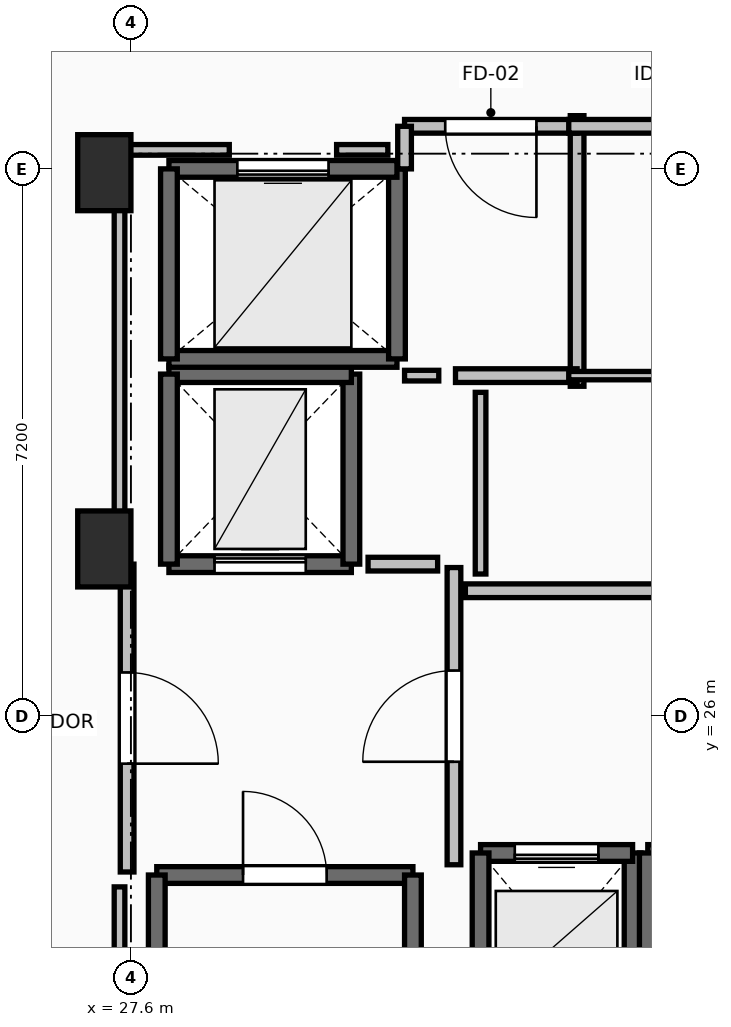
"""IFC4 building model, lengths in metres.
Left out: names, types, materials, properties, quantities, classifications, styles, units other than length and angle.
Written with IfcOpenShell. Run it as: python <this file> out.ifc"""

import sys

from ifc_helpers import new_model, si_unit, direction, frame, frame_2d, origin, origin_2d, place, context, subcontext, project, spatial, rectangle, extrude, element, fill, save


model = new_model("IFC4")
c1 = context("Model", 3, precision=1e-05, world=origin(), true_north=direction((0.0, 1.0)))
c2 = subcontext(c1, "Body", "Model", "MODEL_VIEW")
j1 = project(units=[si_unit("LENGTHUNIT", "METRE"), si_unit("PLANEANGLEUNIT", "RADIAN")], contexts=[c1])
p1 = place(None, origin())
s1 = spatial("IfcSite", under=j1, at=p1, CompositionType="ELEMENT")
p2 = place(p1, origin())
s2 = spatial("IfcBuilding", under=s1, at=p2, CompositionType="ELEMENT")
p3 = place(p2, frame((0.0, 0.0, 210.75)))
s3 = spatial("IfcBuildingStorey", under=s2, at=p3, CompositionType="ELEMENT", Elevation=210.75)
for number, where, z_axis, x_axis in (
    (1, (27.25, 28.2, 0.0), (0.0, 0.0, 1.0), (1.0, 0.0, 0.0)),
    (2, (27.25, 33.15, 0.0), (0.0, 0.0, 1.0), (1.0, 0.0, 0.0)),
):
    element("IfcColumn", number, at=place(p3, frame(where, z_axis=z_axis, x_axis=x_axis)), inside=s3, PredefinedType="PILASTER", context=c2, shape_type="SweptSolid", body=[
        extrude(rectangle(XDim=0.7, YDim=1.0, at=origin_2d()), origin(), (0.0, 0.0, 1.0), 3.55),
    ])
p4 = place(p3, frame((27.94, 23.91, 0.0), z_axis=(0.0, 0.0, 1.0), x_axis=(1.0, 0.0, 0.0)))
e3 = element("IfcWall", 3, at=p4, inside=s3, PredefinedType="SOLIDWALL", context=c2, shape_type="SweptSolid", body=[
    extrude(rectangle(XDim=3.37, YDim=0.22, at=frame_2d((1.685, 0.0))), origin(), (0.0, 0.0, 1.0), 3.29),
])
p5 = place(p4, frame((1.135, 0.0, 0.0)))
e4 = element("IfcOpeningElement", 4, at=p5, cuts=e3, PredefinedType="OPENING", context=c2, shape_type="SweptSolid", body=[
    extrude(rectangle(XDim=1.1, YDim=2.15, at=frame_2d((0.55, 1.075))), frame((0.0, 0.125, 0.0), z_axis=(0.0, -1.0, 0.0), x_axis=(1.0, 0.0, 0.0)), (0.0, 0.0, 1.0), 0.25),
])
for number, where, z_axis, x_axis in (
    (5, (31.31, 23.91, 0.0), (0.0, 0.0, 1.0), (0.0, -1.0, 0.0)),
    (6, (27.94, 16.49, 0.0), (0.0, 0.0, 1.0), (0.0, 1.0, 0.0)),
):
    element("IfcWall", number, at=place(p3, frame(where, z_axis=z_axis, x_axis=x_axis)), inside=s3, PredefinedType="SOLIDWALL", context=c2, shape_type="SweptSolid", body=[
        extrude(rectangle(XDim=7.42, YDim=0.22, at=frame_2d((3.71, 0.0))), origin(), (0.0, 0.0, 1.0), 3.29),
    ])
p6 = place(p3, frame((34.2, 21.8, 0.0), z_axis=(0.0, 0.0, 1.0), x_axis=(0.0, 1.0, 0.0)))
e7 = element("IfcWall", 7, at=p6, inside=s3, PredefinedType="SOLIDWALL", context=c2, shape_type="SweptSolid", body=[
    extrude(rectangle(XDim=2.4, YDim=0.22, at=frame_2d((1.2, 0.0))), origin(), (0.0, 0.0, 1.0), 3.29),
])
p7 = place(p3, frame((34.2, 24.2, 0.0), z_axis=(0.0, 0.0, 1.0), x_axis=(-1.0, 0.0, 0.0)))
e8 = element("IfcWall", 8, at=p7, inside=s3, PredefinedType="SOLIDWALL", context=c2, shape_type="SweptSolid", body=[
    extrude(rectangle(XDim=2.0, YDim=0.22, at=frame_2d((1.0, 0.0))), origin(), (0.0, 0.0, 1.0), 3.29),
])
p8 = place(p7, frame((0.45, 0.0, 0.0)))
e9 = element("IfcOpeningElement", 9, at=p8, cuts=e8, PredefinedType="OPENING", context=c2, shape_type="SweptSolid", body=[
    extrude(rectangle(XDim=1.1, YDim=2.2, at=frame_2d((0.55, 1.1))), frame((0.0, 0.125, 0.0), z_axis=(0.0, -1.0, 0.0), x_axis=(1.0, 0.0, 0.0)), (0.0, 0.0, 1.0), 0.25),
])
p9 = place(p3, frame((32.2, 24.2, 0.0), z_axis=(0.0, 0.0, 1.0), x_axis=(0.0, -1.0, 0.0)))
e10 = element("IfcWall", 10, at=p9, inside=s3, PredefinedType="SOLIDWALL", context=c2, shape_type="SweptSolid", body=[
    extrude(rectangle(XDim=2.4, YDim=0.22, at=frame_2d((1.2, 0.0))), origin(), (0.0, 0.0, 1.0), 3.29),
])
p10 = place(p3, frame((36.4, 24.2, 0.0), z_axis=(0.0, 0.0, 1.0), x_axis=(-1.0, 0.0, 0.0)))
e11 = element("IfcWall", 11, at=p10, inside=s3, PredefinedType="SOLIDWALL", context=c2, shape_type="SweptSolid", body=[
    extrude(rectangle(XDim=2.0, YDim=0.22, at=frame_2d((1.0, 0.0))), origin(), (0.0, 0.0, 1.0), 3.29),
])
p11 = place(p10, frame((0.45, 0.0, 0.0)))
e12 = element("IfcOpeningElement", 12, at=p11, cuts=e11, PredefinedType="OPENING", context=c2, shape_type="SweptSolid", body=[
    extrude(rectangle(XDim=1.1, YDim=2.2, at=frame_2d((0.55, 1.1))), frame((0.0, 0.125, 0.0), z_axis=(0.0, -1.0, 0.0), x_axis=(1.0, 0.0, 0.0)), (0.0, 0.0, 1.0), 0.25),
])
p12 = place(p3, frame((34.4, 24.2, 0.0), z_axis=(0.0, 0.0, 1.0), x_axis=(0.0, -1.0, 0.0)))
e13 = element("IfcWall", 13, at=p12, inside=s3, PredefinedType="SOLIDWALL", context=c2, shape_type="SweptSolid", body=[
    extrude(rectangle(XDim=2.4, YDim=0.22, at=frame_2d((1.2, 0.0))), origin(), (0.0, 0.0, 1.0), 3.29),
])
p13 = place(p3, frame((28.1, 28.0, 0.0), z_axis=(0.0, 0.0, 1.0), x_axis=(1.0, 0.0, 0.0)))
e14 = element("IfcWall", 14, at=p13, inside=s3, PredefinedType="SHEAR", context=c2, shape_type="SweptSolid", body=[
    extrude(rectangle(XDim=2.4, YDim=0.22, at=frame_2d((1.2, 0.0))), origin(), (0.0, 0.0, 1.0), 3.29),
])
p14 = place(p13, frame((0.6, 0.0, 0.0)))
e15 = element("IfcOpeningElement", 15, at=p14, cuts=e14, PredefinedType="OPENING", context=c2, shape_type="SweptSolid", body=[
    extrude(rectangle(XDim=1.2, YDim=2.2, at=frame_2d((0.6, 1.1))), frame((0.0, 0.125, 0.0), z_axis=(0.0, -1.0, 0.0), x_axis=(1.0, 0.0, 0.0)), (0.0, 0.0, 1.0), 0.25),
])
p15 = place(p3, frame((30.5, 28.0, 0.0), z_axis=(0.0, 0.0, 1.0), x_axis=(0.0, 1.0, 0.0)))
e16 = element("IfcWall", 16, at=p15, inside=s3, PredefinedType="SHEAR", context=c2, shape_type="SweptSolid", body=[
    extrude(rectangle(XDim=2.5, YDim=0.22, at=frame_2d((1.25, 0.0))), origin(), (0.0, 0.0, 1.0), 3.29),
])
p16 = place(p3, frame((30.5, 30.5, 0.0), z_axis=(0.0, 0.0, 1.0), x_axis=(-1.0, 0.0, 0.0)))
e17 = element("IfcWall", 17, at=p16, inside=s3, PredefinedType="SHEAR", context=c2, shape_type="SweptSolid", body=[
    extrude(rectangle(XDim=2.4, YDim=0.22, at=frame_2d((1.2, 0.0))), origin(), (0.0, 0.0, 1.0), 3.29),
])
p17 = place(p3, frame((28.1, 30.5, 0.0), z_axis=(0.0, 0.0, 1.0), x_axis=(0.0, -1.0, 0.0)))
e18 = element("IfcWall", 18, at=p17, inside=s3, PredefinedType="SHEAR", context=c2, shape_type="SweptSolid", body=[
    extrude(rectangle(XDim=2.5, YDim=0.22, at=frame_2d((1.25, 0.0))), origin(), (0.0, 0.0, 1.0), 3.29),
])
p18 = place(p3, frame((28.1, 30.7, 0.0), z_axis=(0.0, 0.0, 1.0), x_axis=(1.0, 0.0, 0.0)))
e19 = element("IfcWall", 19, at=p18, inside=s3, PredefinedType="SOLIDWALL", context=c2, shape_type="SweptSolid", body=[
    extrude(rectangle(XDim=3.0, YDim=0.22, at=frame_2d((1.5, 0.0))), origin(), (0.0, 0.0, 1.0), 3.29),
])
p19 = place(p3, frame((31.1, 30.7, 0.0), z_axis=(0.0, 0.0, 1.0), x_axis=(0.0, 1.0, 0.0)))
e20 = element("IfcWall", 20, at=p19, inside=s3, PredefinedType="SOLIDWALL", context=c2, shape_type="SweptSolid", body=[
    extrude(rectangle(XDim=2.5, YDim=0.22, at=frame_2d((1.25, 0.0))), origin(), (0.0, 0.0, 1.0), 3.29),
])
p20 = place(p3, frame((31.1, 33.2, 0.0), z_axis=(0.0, 0.0, 1.0), x_axis=(-1.0, 0.0, 0.0)))
e21 = element("IfcWall", 21, at=p20, inside=s3, PredefinedType="SOLIDWALL", context=c2, shape_type="SweptSolid", body=[
    extrude(rectangle(XDim=3.0, YDim=0.22, at=frame_2d((1.5, 0.0))), origin(), (0.0, 0.0, 1.0), 3.29),
])
p21 = place(p20, frame((0.9, 0.0, 0.0)))
e22 = element("IfcOpeningElement", 22, at=p21, cuts=e21, PredefinedType="OPENING", context=c2, shape_type="SweptSolid", body=[
    extrude(rectangle(XDim=1.2, YDim=2.2, at=frame_2d((0.6, 1.1))), frame((0.0, 0.125, 0.0), z_axis=(0.0, -1.0, 0.0), x_axis=(1.0, 0.0, 0.0)), (0.0, 0.0, 1.0), 0.25),
])
p22 = place(p3, frame((28.1, 33.2, 0.0), z_axis=(0.0, 0.0, 1.0), x_axis=(0.0, -1.0, 0.0)))
e23 = element("IfcWall", 23, at=p22, inside=s3, PredefinedType="SOLIDWALL", context=c2, shape_type="SweptSolid", body=[
    extrude(rectangle(XDim=2.5, YDim=0.22, at=frame_2d((1.25, 0.0))), origin(), (0.0, 0.0, 1.0), 3.29),
])
p23 = place(p3, frame((31.85, 24.045, 0.0), z_axis=(0.0, 0.0, 1.0), x_axis=(0.0, 1.0, 0.0)))
e24 = element("IfcWall", 24, at=p23, inside=s3, PredefinedType="PARTITIONING", context=c2, shape_type="SweptSolid", body=[
    extrude(rectangle(XDim=3.91, YDim=0.18, at=frame_2d((1.955, 0.0))), origin(), (0.0, 0.0, 1.0), 3.29),
])
p24 = place(p23, frame((1.355, 0.0, 0.0)))
e25 = element("IfcOpeningElement", 25, at=p24, cuts=e24, PredefinedType="OPENING", context=c2, shape_type="SweptSolid", body=[
    extrude(rectangle(XDim=1.2, YDim=2.15, at=frame_2d((0.6, 1.075))), frame((0.0, 0.105, 0.0), z_axis=(0.0, -1.0, 0.0), x_axis=(1.0, 0.0, 0.0)), (0.0, 0.0, 1.0), 0.21),
])
p25 = place(p3, frame((27.55, 28.0, 0.0), z_axis=(0.0, 0.0, 1.0), x_axis=(0.0, -1.0, 0.0)))
e26 = element("IfcWall", 26, at=p25, inside=s3, PredefinedType="PARTITIONING", context=c2, shape_type="SweptSolid", body=[
    extrude(rectangle(XDim=4.05, YDim=0.18, at=frame_2d((2.025, 0.0))), origin(), (0.0, 0.0, 1.0), 3.29),
])
p26 = place(p25, frame((1.425, 0.0, 0.0)))
e27 = element("IfcOpeningElement", 27, at=p26, cuts=e26, PredefinedType="OPENING", context=c2, shape_type="SweptSolid", body=[
    extrude(rectangle(XDim=1.2, YDim=2.15, at=frame_2d((0.6, 1.075))), frame((0.0, 0.105, 0.0), z_axis=(0.0, -1.0, 0.0), x_axis=(1.0, 0.0, 0.0)), (0.0, 0.0, 1.0), 0.21),
])
p27 = place(p3, frame((33.47, 30.34, 0.0), z_axis=(0.0, 0.0, 1.0), x_axis=(0.0, 1.0, 0.0)))
e28 = element("IfcWall", 28, at=p27, inside=s3, PredefinedType="PARTITIONING", context=c2, shape_type="SweptSolid", body=[
    extrude(rectangle(XDim=3.56, YDim=0.18, at=frame_2d((1.78, 0.0))), origin(), (0.0, 0.0, 1.0), 3.29),
])
p28 = place(p3, frame((31.87, 30.48, 0.0), z_axis=(0.0, 0.0, 1.0), x_axis=(1.0, 0.0, 0.0)))
e29 = element("IfcWall", 29, at=p28, inside=s3, PredefinedType="PARTITIONING", context=c2, shape_type="SweptSolid", body=[
    extrude(rectangle(XDim=1.6, YDim=0.18, at=frame_2d((0.8, 0.0))), origin(), (0.0, 0.0, 1.0), 3.29),
])
p29 = place(p3, frame((33.47, 33.76, 0.0), z_axis=(0.0, 0.0, 1.0), x_axis=(-1.0, 0.0, 0.0)))
e30 = element("IfcWall", 30, at=p29, inside=s3, PredefinedType="PARTITIONING", context=c2, shape_type="SweptSolid", body=[
    extrude(rectangle(XDim=2.27, YDim=0.18, at=frame_2d((1.135, 0.0))), origin(), (0.0, 0.0, 1.0), 3.29),
])
p30 = place(p29, frame((0.535, 0.0, 0.0)))
e31 = element("IfcOpeningElement", 31, at=p30, cuts=e30, PredefinedType="OPENING", context=c2, shape_type="SweptSolid", body=[
    extrude(rectangle(XDim=1.2, YDim=2.15, at=frame_2d((0.6, 1.075))), frame((0.0, 0.105, 0.0), z_axis=(0.0, -1.0, 0.0), x_axis=(1.0, 0.0, 0.0)), (0.0, 0.0, 1.0), 0.21),
])
p31 = place(p3, frame((31.2, 33.76, 0.0), z_axis=(0.0, 0.0, 1.0), x_axis=(0.0, -1.0, 0.0)))
e32 = element("IfcWall", 32, at=p31, inside=s3, PredefinedType="PARTITIONING", context=c2, shape_type="SweptSolid", body=[
    extrude(rectangle(XDim=0.56, YDim=0.18, at=frame_2d((0.28, 0.0))), origin(), (0.0, 0.0, 1.0), 3.29),
])
p32 = place(p3, frame((39.19, 27.65, 0.0), z_axis=(0.0, 0.0, 1.0), x_axis=(-1.0, 0.0, 0.0)))
e33 = element("IfcWall", 33, at=p32, inside=s3, PredefinedType="PARTITIONING", context=c2, shape_type="SweptSolid", body=[
    extrude(rectangle(XDim=7.19, YDim=0.18, at=frame_2d((3.595, 0.0))), origin(), (0.0, 0.0, 1.0), 3.29),
])
p33 = place(p32, frame((3.095, 0.0, 0.0)))
e34 = element("IfcOpeningElement", 34, at=p33, cuts=e33, PredefinedType="OPENING", context=c2, shape_type="SweptSolid", body=[
    extrude(rectangle(XDim=1.0, YDim=2.15, at=frame_2d((0.5, 1.075))), frame((0.0, 0.105, 0.0), z_axis=(0.0, -1.0, 0.0), x_axis=(1.0, 0.0, 0.0)), (0.0, 0.0, 1.0), 0.21),
])
p34 = place(p3, frame((33.36, 30.48, 0.0), z_axis=(0.0, 0.0, 1.0), x_axis=(1.0, 0.0, 0.0)))
e35 = element("IfcWall", 35, at=p34, inside=s3, PredefinedType="PARTITIONING", context=c2, shape_type="SweptSolid", body=[
    extrude(rectangle(XDim=4.115, YDim=0.11, at=frame_2d((2.058, 0.0))), origin(), (0.0, 0.0, 1.0), 2.482),
])
p35 = place(p3, frame((37.49, 33.76, 0.0), z_axis=(0.0, 0.0, 1.0), x_axis=(-1.0, 0.0, 0.0)))
e36 = element("IfcWall", 36, at=p35, inside=s3, PredefinedType="PARTITIONING", context=c2, shape_type="SweptSolid", body=[
    extrude(rectangle(XDim=4.13, YDim=0.18, at=frame_2d((2.065, 0.0))), origin(), (0.0, 0.0, 1.0), 3.29),
])
p36 = place(p35, frame((1.64, 0.0, 0.0)))
e37 = element("IfcOpeningElement", 37, at=p36, cuts=e36, PredefinedType="OPENING", context=c2, shape_type="SweptSolid", body=[
    extrude(rectangle(XDim=0.85, YDim=2.1, at=frame_2d((0.425, 1.05))), frame((0.0, 0.105, 0.0), z_axis=(0.0, -1.0, 0.0), x_axis=(1.0, 0.0, 0.0)), (0.0, 0.0, 1.0), 0.21),
])
p37 = place(p3, frame((31.635, 28.0, 0.0), z_axis=(0.0, 0.0, 1.0), x_axis=(-1.0, 0.0, 0.0)))
e38 = element("IfcWall", 38, at=p37, inside=s3, PredefinedType="PARTITIONING", context=c2, shape_type="SweptSolid", body=[
    extrude(rectangle(XDim=0.915, YDim=0.18, at=frame_2d((0.458, 0.0))), origin(), (0.0, 0.0, 1.0), 3.29),
])
p38 = place(p3, frame((31.2, 30.48, 0.0), z_axis=(0.0, 0.0, 1.0), x_axis=(1.0, 0.0, 0.0)))
e39 = element("IfcWall", 39, at=p38, inside=s3, PredefinedType="PARTITIONING", context=c2, shape_type="SweptSolid", body=[
    extrude(rectangle(XDim=0.45, YDim=0.14, at=frame_2d((0.225, 0.0))), origin(), (0.0, 0.0, 1.0), 3.29),
])
p39 = place(p3, frame((32.2, 30.26, 0.0), z_axis=(0.0, 0.0, 1.0), x_axis=(0.0, -1.0, 0.0)))
e40 = element("IfcWall", 40, at=p39, inside=s3, PredefinedType="PARTITIONING", context=c2, shape_type="SweptSolid", body=[
    extrude(rectangle(XDim=2.39, YDim=0.14, at=frame_2d((1.195, 0.0))), origin(), (0.0, 0.0, 1.0), 3.29),
])
p40 = place(p3, frame((30.98, 33.45, 0.0), z_axis=(0.0, 0.0, 1.0), x_axis=(-1.0, 0.0, 0.0)))
e41 = element("IfcWall", 41, at=p40, inside=s3, PredefinedType="PARTITIONING", context=c2, shape_type="SweptSolid", body=[
    extrude(rectangle(XDim=0.674, YDim=0.14, at=frame_2d((0.337, 0.0))), origin(), (0.0, 0.0, 1.0), 3.29),
])
p41 = place(p3, frame((28.894, 33.45, 0.0), z_axis=(0.0, 0.0, 1.0), x_axis=(-1.0, 0.0, 0.0)))
e42 = element("IfcWall", 42, at=p41, inside=s3, PredefinedType="PARTITIONING", context=c2, shape_type="SweptSolid", body=[
    extrude(rectangle(XDim=1.444, YDim=0.14, at=frame_2d((0.722, 0.0))), origin(), (0.0, 0.0, 1.0), 2.482),
])
p42 = place(p3, frame((27.45, 33.45, 0.0), z_axis=(0.0, 0.0, 1.0), x_axis=(0.0, -1.0, 0.0)))
e43 = element("IfcWall", 43, at=p42, inside=s3, PredefinedType="PARTITIONING", context=c2, shape_type="SweptSolid", body=[
    extrude(rectangle(XDim=5.254, YDim=0.14, at=frame_2d((2.627, 0.0))), origin(), (0.0, 0.0, 1.0), 2.482),
])
p43 = place(p3, frame((27.45, 23.754, 0.0), z_axis=(0.0, 0.0, 1.0), x_axis=(0.0, -1.0, 0.0)))
e44 = element("IfcWall", 44, at=p43, inside=s3, PredefinedType="PARTITIONING", context=c2, shape_type="SweptSolid", body=[
    extrude(rectangle(XDim=7.514, YDim=0.14, at=frame_2d((3.757, 0.0))), origin(), (0.0, 0.0, 1.0), 2.482),
])
p44 = place(p5, origin())
e45 = element("IfcDoor", 45, at=p44, inside=s3, OperationType="SINGLE_SWING_LEFT", PredefinedType="DOOR", context=c2, shape_type="SweptSolid", body=[
    extrude(rectangle(XDim=1.1, YDim=2.15, at=frame_2d((0.55, 1.075))), frame((0.0, 0.025, 0.0), z_axis=(0.0, -1.0, 0.0), x_axis=(1.0, 0.0, 0.0)), (0.0, 0.0, 1.0), 0.05),
])
fill(e4, e45)
p45 = place(p8, origin())
e46 = element("IfcDoor", 46, at=p45, inside=s3, OperationType="SLIDING_TO_LEFT", PredefinedType="DOOR", context=c2, shape_type="SweptSolid", body=[
    extrude(rectangle(XDim=1.1, YDim=2.2, at=frame_2d((0.55, 1.1))), frame((0.0, 0.025, 0.0), z_axis=(0.0, -1.0, 0.0), x_axis=(1.0, 0.0, 0.0)), (0.0, 0.0, 1.0), 0.05),
])
fill(e9, e46)
p46 = place(p14, origin())
e47 = element("IfcDoor", 47, at=p46, inside=s3, OperationType="SLIDING_TO_LEFT", PredefinedType="DOOR", context=c2, shape_type="SweptSolid", body=[
    extrude(rectangle(XDim=1.2, YDim=2.2, at=frame_2d((0.6, 1.1))), frame((0.0, 0.025, 0.0), z_axis=(0.0, -1.0, 0.0), x_axis=(1.0, 0.0, 0.0)), (0.0, 0.0, 1.0), 0.05),
])
fill(e15, e47)
p47 = place(p21, origin())
e48 = element("IfcDoor", 48, at=p47, inside=s3, OperationType="SLIDING_TO_LEFT", PredefinedType="DOOR", context=c2, shape_type="SweptSolid", body=[
    extrude(rectangle(XDim=1.2, YDim=2.2, at=frame_2d((0.6, 1.1))), frame((0.0, 0.025, 0.0), z_axis=(0.0, -1.0, 0.0), x_axis=(1.0, 0.0, 0.0)), (0.0, 0.0, 1.0), 0.05),
])
fill(e22, e48)
p48 = place(p24, origin())
e49 = element("IfcDoor", 49, at=p48, inside=s3, OperationType="SINGLE_SWING_LEFT", PredefinedType="DOOR", context=c2, shape_type="SweptSolid", body=[
    extrude(rectangle(XDim=1.2, YDim=2.15, at=frame_2d((0.6, 1.075))), frame((0.0, 0.025, 0.0), z_axis=(0.0, -1.0, 0.0), x_axis=(1.0, 0.0, 0.0)), (0.0, 0.0, 1.0), 0.05),
])
fill(e25, e49)
p49 = place(p26, origin())
e50 = element("IfcDoor", 50, at=p49, inside=s3, OperationType="SINGLE_SWING_RIGHT", PredefinedType="DOOR", context=c2, shape_type="SweptSolid", body=[
    extrude(rectangle(XDim=1.2, YDim=2.15, at=frame_2d((0.6, 1.075))), frame((0.0, 0.025, 0.0), z_axis=(0.0, -1.0, 0.0), x_axis=(1.0, 0.0, 0.0)), (0.0, 0.0, 1.0), 0.05),
])
fill(e27, e50)
p50 = place(p30, origin())
e51 = element("IfcDoor", 51, at=p50, inside=s3, OperationType="SINGLE_SWING_LEFT", PredefinedType="DOOR", context=c2, shape_type="SweptSolid", body=[
    extrude(rectangle(XDim=1.2, YDim=2.15, at=frame_2d((0.6, 1.075))), frame((0.0, 0.025, 0.0), z_axis=(0.0, -1.0, 0.0), x_axis=(1.0, 0.0, 0.0)), (0.0, 0.0, 1.0), 0.05),
])
fill(e31, e51)
save(model, sys.argv[1])
